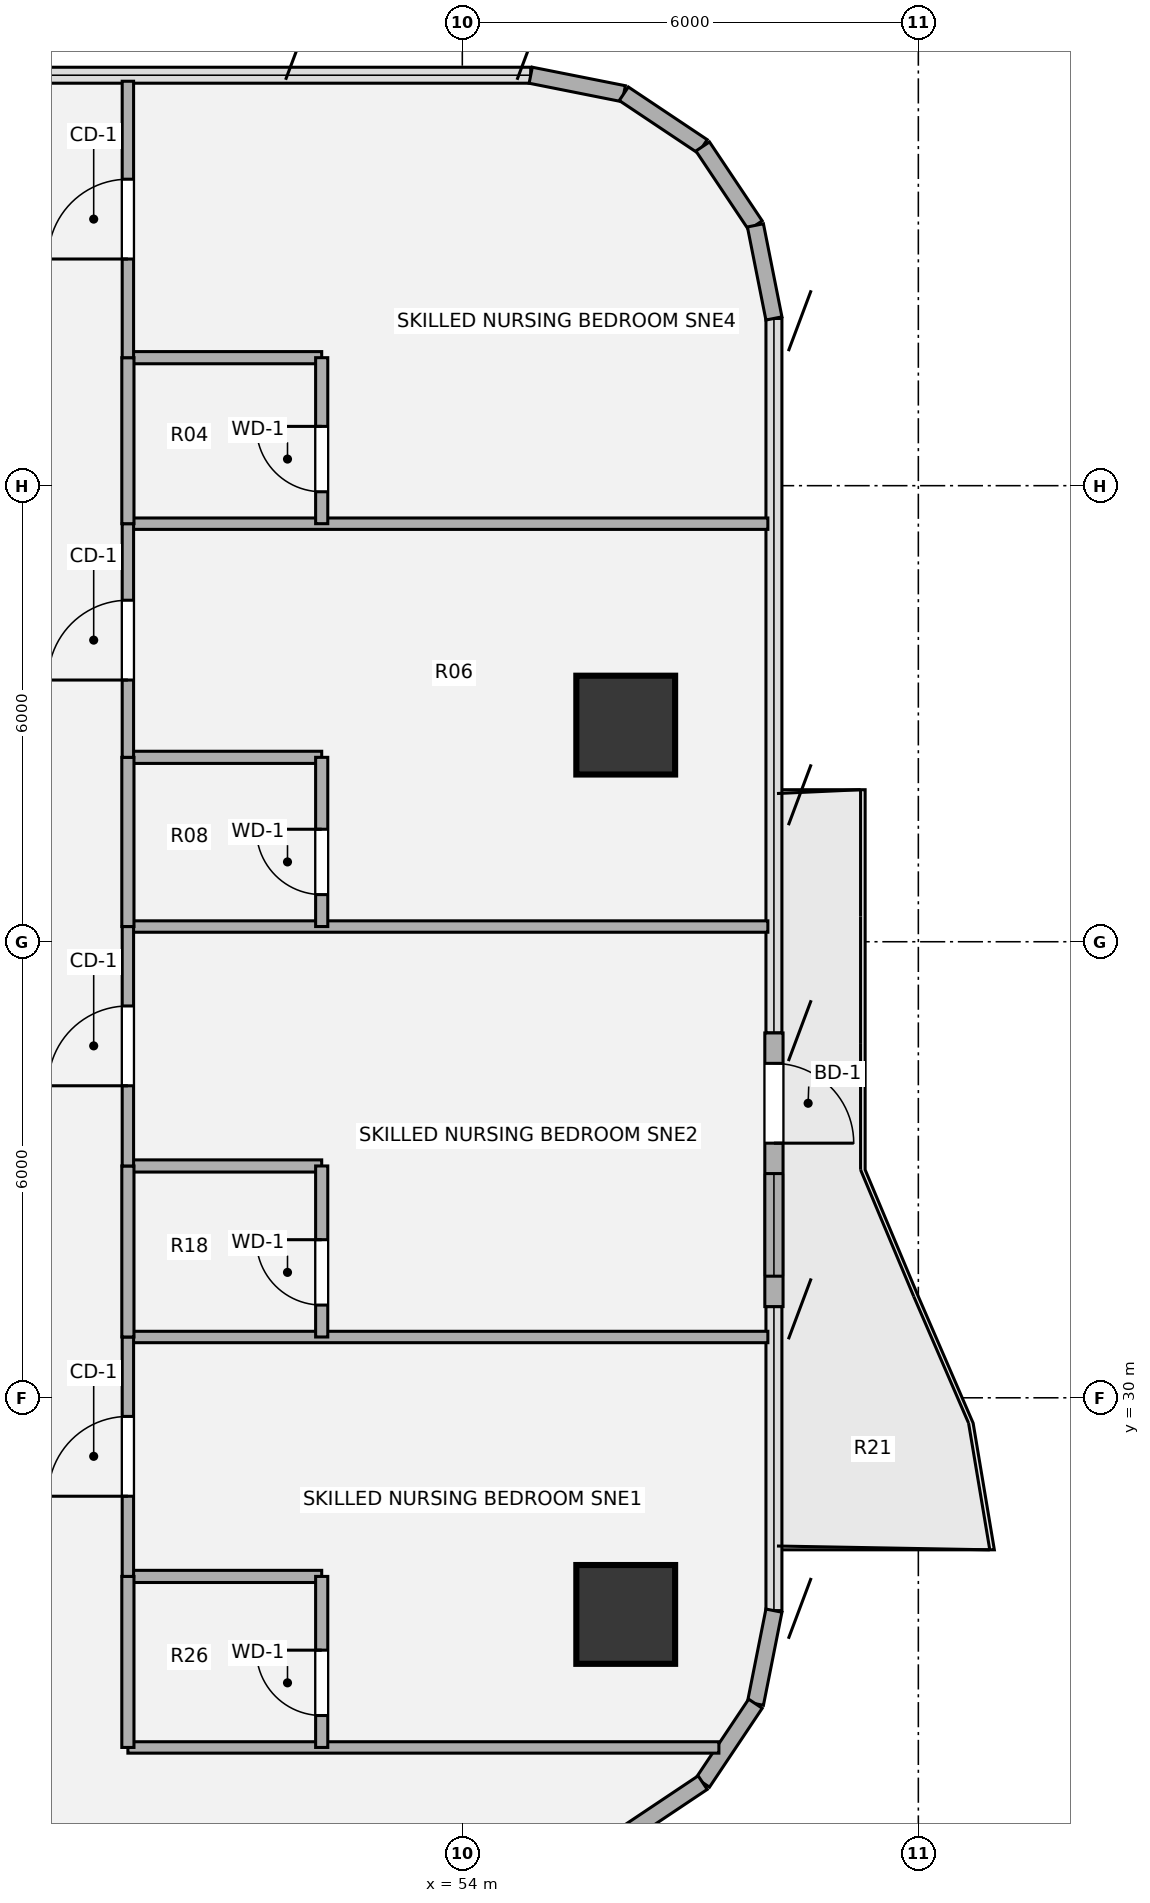
"""IFC4 building model, lengths in metres.
Left out: names, types, materials, properties, quantities, classifications, styles, units other than length and angle.
Written with IfcOpenShell. Run it as: python <this file> out.ifc"""

import sys

from ifc_helpers import new_model, si_unit, direction, frame, frame_2d, origin, origin_2d, place, context, subcontext, project, spatial, rectangle, hollow_circle, extrude, source, transform, mapped, element, fill, save


model = new_model("IFC4")
c1 = context("Model", 3, precision=1e-05, world=origin(), true_north=direction((0.0, 1.0)))
c2 = subcontext(c1, "Body", "Model", "MODEL_VIEW")
j1 = project(units=[si_unit("LENGTHUNIT", "METRE"), si_unit("PLANEANGLEUNIT", "RADIAN")], contexts=[c1])
p1 = place(None, origin())
s1 = spatial("IfcSite", under=j1, at=p1, CompositionType="ELEMENT")
p2 = place(p1, origin())
s2 = spatial("IfcBuilding", under=s1, at=p2, CompositionType="ELEMENT")
p3 = place(p2, frame((0.0, 0.0, 127.62)))
s3 = spatial("IfcBuildingStorey", under=s2, at=p3, CompositionType="ELEMENT", Elevation=127.62)
m1 = source(origin(), c2, "Body", "SweptSolid", [
    extrude(hollow_circle(Radius=0.65, WallThickness=0.045, at=origin_2d()), origin(), (0.0, 0.0, 1.0), 3.78),
])
for number, where, z_axis, x_axis in (
    (1, (56.15, 27.15, 0.0), (0.0, 0.0, 1.0), (1.0, 0.0, 0.0)),
    (2, (56.15, 38.85, 0.0), (0.0, 0.0, 1.0), (1.0, 0.0, 0.0)),
):
    element("IfcColumn", number, at=place(p3, frame(where, z_axis=z_axis, x_axis=x_axis)), inside=s3, PredefinedType="COLUMN", context=c2, shape_type="MappedRepresentation", body=[
        mapped(m1, transform((0.0, 0.0, 0.0), x_axis=(1.0, 0.0, 0.0), y_axis=(0.0, 1.0, 0.0), z_axis=(0.0, 0.0, 1.0), scale=1.0)),
    ])
for number, where, z_axis, x_axis in (
    (3, (54.9, 47.4, 0.0), (0.0, 0.0, 1.0), (0.981, -0.195, 0.0)),
    (4, (56.125, 47.156, 0.0), (0.0, 0.0, 1.0), (0.831, -0.556, 0.0)),
    (5, (57.163, 46.463, 0.0), (0.0, 0.0, 1.0), (0.556, -0.831, 0.0)),
    (6, (57.856, 45.425, 0.0), (0.0, 0.0, 1.0), (0.195, -0.981, 0.0)),
):
    element("IfcWall", number, at=place(p3, frame(where, z_axis=z_axis, x_axis=x_axis)), inside=s3, PredefinedType="SOLIDWALL", context=c2, shape_type="SweptSolid", body=[
        extrude(rectangle(XDim=1.249, YDim=0.215, at=frame_2d((0.624, 0.0))), origin(), (0.0, 0.0, 1.0), 3.53),
    ])
p4 = place(p3, frame((58.1, 34.8, 0.0), z_axis=(0.0, 0.0, 1.0), x_axis=(0.0, -1.0, 0.0)))
e7 = element("IfcWall", 7, at=p4, inside=s3, PredefinedType="SOLIDWALL", context=c2, shape_type="SweptSolid", body=[
    extrude(rectangle(XDim=3.6, YDim=0.24, at=frame_2d((1.8, 0.0))), origin(), (0.0, 0.0, 1.0), 3.53),
])
p5 = place(p4, frame((0.4, 0.0, 0.0)))
e8 = element("IfcOpeningElement", 8, at=p5, cuts=e7, PredefinedType="OPENING", context=c2, shape_type="SweptSolid", body=[
    extrude(rectangle(XDim=1.05, YDim=2.15, at=origin_2d()), frame((0.525, 0.13, 1.075), z_axis=(0.0, -1.0, 0.0), x_axis=(1.0, 0.0, 0.0)), (0.0, 0.0, 1.0), 0.26),
])
p6 = place(p4, frame((1.85, 0.0, 0.85)))
e9 = element("IfcOpeningElement", 9, at=p6, cuts=e7, PredefinedType="OPENING", context=c2, shape_type="SweptSolid", body=[
    extrude(rectangle(XDim=1.35, YDim=1.35, at=origin_2d()), frame((0.675, 0.13, 0.675), z_axis=(0.0, -1.0, 0.0), x_axis=(1.0, 0.0, 0.0)), (0.0, 0.0, 1.0), 0.26),
])
for number, where, z_axis, x_axis in (
    (10, (58.1, 27.2, 0.0), (0.0, 0.0, 1.0), (-0.195, -0.981, 0.0)),
    (11, (57.856, 25.975, 0.0), (0.0, 0.0, 1.0), (-0.556, -0.831, 0.0)),
    (12, (57.163, 24.937, 0.0), (0.0, 0.0, 1.0), (-0.831, -0.556, 0.0)),
):
    element("IfcWall", number, at=place(p3, frame(where, z_axis=z_axis, x_axis=x_axis)), inside=s3, PredefinedType="SOLIDWALL", context=c2, shape_type="SweptSolid", body=[
        extrude(rectangle(XDim=1.249, YDim=0.215, at=frame_2d((0.624, 0.0))), origin(), (0.0, 0.0, 1.0), 3.53),
    ])
p7 = place(p3, frame((49.6, 25.4, 0.0), z_axis=(0.0, 0.0, 1.0), x_axis=(1.0, 0.0, 0.0)))
e13 = element("IfcWall", 13, at=p7, inside=s3, PredefinedType="PARTITIONING", context=c2, shape_type="SweptSolid", body=[
    extrude(rectangle(XDim=7.776, YDim=0.15, at=frame_2d((3.888, 0.0))), origin(), (0.0, 0.0, 1.0), 3.5),
])
p8 = place(p3, frame((49.6, 27.65, 0.0), z_axis=(0.0, 0.0, 1.0), x_axis=(1.0, 0.0, 0.0)))
e14 = element("IfcWall", 14, at=p8, inside=s3, PredefinedType="PLUMBINGWALL", context=c2, shape_type="SweptSolid", body=[
    extrude(rectangle(XDim=2.55, YDim=0.16, at=frame_2d((1.275, 0.0))), origin(), (0.0, 0.0, 1.0), 2.982),
])
p9 = place(p3, frame((49.6, 30.8, 0.0), z_axis=(0.0, 0.0, 1.0), x_axis=(1.0, 0.0, 0.0)))
e15 = element("IfcWall", 15, at=p9, inside=s3, PredefinedType="PARTITIONING", context=c2, shape_type="SweptSolid", body=[
    extrude(rectangle(XDim=8.42, YDim=0.15, at=frame_2d((4.21, 0.0))), origin(), (0.0, 0.0, 1.0), 2.982),
])
p10 = place(p3, frame((49.6, 33.05, 0.0), z_axis=(0.0, 0.0, 1.0), x_axis=(1.0, 0.0, 0.0)))
e16 = element("IfcWall", 16, at=p10, inside=s3, PredefinedType="PLUMBINGWALL", context=c2, shape_type="SweptSolid", body=[
    extrude(rectangle(XDim=2.55, YDim=0.16, at=frame_2d((1.275, 0.0))), origin(), (0.0, 0.0, 1.0), 2.982),
])
p11 = place(p3, frame((49.6, 36.2, 0.0), z_axis=(0.0, 0.0, 1.0), x_axis=(1.0, 0.0, 0.0)))
e17 = element("IfcWall", 17, at=p11, inside=s3, PredefinedType="PARTITIONING", context=c2, shape_type="SweptSolid", body=[
    extrude(rectangle(XDim=8.42, YDim=0.15, at=frame_2d((4.21, 0.0))), origin(), (0.0, 0.0, 1.0), 2.982),
])
p12 = place(p3, frame((49.6, 38.426, 0.0), z_axis=(0.0, 0.0, 1.0), x_axis=(1.0, 0.0, 0.0)))
e18 = element("IfcWall", 18, at=p12, inside=s3, PredefinedType="PLUMBINGWALL", context=c2, shape_type="SweptSolid", body=[
    extrude(rectangle(XDim=2.55, YDim=0.16, at=frame_2d((1.275, 0.0))), origin(), (0.0, 0.0, 1.0), 3.055),
])
p13 = place(p3, frame((49.6, 41.5, 0.0), z_axis=(0.0, 0.0, 1.0), x_axis=(1.0, 0.0, 0.0)))
e19 = element("IfcWall", 19, at=p13, inside=s3, PredefinedType="PARTITIONING", context=c2, shape_type="SweptSolid", body=[
    extrude(rectangle(XDim=8.42, YDim=0.15, at=frame_2d((4.21, 0.0))), origin(), (0.0, 0.0, 1.0), 3.5),
])
p14 = place(p3, frame((49.6, 43.684, 0.0), z_axis=(0.0, 0.0, 1.0), x_axis=(1.0, 0.0, 0.0)))
e20 = element("IfcWall", 20, at=p14, inside=s3, PredefinedType="PLUMBINGWALL", context=c2, shape_type="SweptSolid", body=[
    extrude(rectangle(XDim=2.55, YDim=0.16, at=frame_2d((1.275, 0.0))), origin(), (0.0, 0.0, 1.0), 3.5),
])
p15 = place(p3, frame((49.6, 25.4, 0.0), z_axis=(0.0, 0.0, 1.0), x_axis=(0.0, 1.0, 0.0)))
e21 = element("IfcWall", 21, at=p15, inside=s3, PredefinedType="PLUMBINGWALL", context=c2, shape_type="SweptSolid", body=[
    extrude(rectangle(XDim=2.25, YDim=0.16, at=frame_2d((1.125, 0.0))), origin(), (0.0, 0.0, 1.0), 3.5),
])
p16 = place(p3, frame((49.6, 27.65, 0.0), z_axis=(0.0, 0.0, 1.0), x_axis=(0.0, 1.0, 0.0)))
e22 = element("IfcWall", 22, at=p16, inside=s3, PredefinedType="PARTITIONING", context=c2, shape_type="SweptSolid", body=[
    extrude(rectangle(XDim=3.15, YDim=0.15, at=frame_2d((1.575, 0.0))), origin(), (0.0, 0.0, 1.0), 3.5),
])
p17 = place(p16, frame((1.055, 0.0, 0.0)))
e23 = element("IfcOpeningElement", 23, at=p17, cuts=e22, PredefinedType="OPENING", context=c2, shape_type="SweptSolid", body=[
    extrude(rectangle(XDim=1.05, YDim=2.1, at=origin_2d()), frame((0.525, 0.085, 1.05), z_axis=(0.0, -1.0, 0.0), x_axis=(1.0, 0.0, 0.0)), (0.0, 0.0, 1.0), 0.17),
])
p18 = place(p3, frame((49.6, 30.8, 0.0), z_axis=(0.0, 0.0, 1.0), x_axis=(0.0, 1.0, 0.0)))
e24 = element("IfcWall", 24, at=p18, inside=s3, PredefinedType="PLUMBINGWALL", context=c2, shape_type="SweptSolid", body=[
    extrude(rectangle(XDim=2.25, YDim=0.16, at=frame_2d((1.125, 0.0))), origin(), (0.0, 0.0, 1.0), 3.5),
])
p19 = place(p3, frame((49.6, 33.05, 0.0), z_axis=(0.0, 0.0, 1.0), x_axis=(0.0, 1.0, 0.0)))
e25 = element("IfcWall", 25, at=p19, inside=s3, PredefinedType="PARTITIONING", context=c2, shape_type="SweptSolid", body=[
    extrude(rectangle(XDim=3.15, YDim=0.15, at=frame_2d((1.575, 0.0))), origin(), (0.0, 0.0, 1.0), 3.5),
])
p20 = place(p19, frame((1.055, 0.0, 0.0)))
e26 = element("IfcOpeningElement", 26, at=p20, cuts=e25, PredefinedType="OPENING", context=c2, shape_type="SweptSolid", body=[
    extrude(rectangle(XDim=1.05, YDim=2.1, at=origin_2d()), frame((0.525, 0.085, 1.05), z_axis=(0.0, -1.0, 0.0), x_axis=(1.0, 0.0, 0.0)), (0.0, 0.0, 1.0), 0.17),
])
p21 = place(p3, frame((49.6, 36.2, 0.0), z_axis=(0.0, 0.0, 1.0), x_axis=(0.0, 1.0, 0.0)))
e27 = element("IfcWall", 27, at=p21, inside=s3, PredefinedType="PLUMBINGWALL", context=c2, shape_type="SweptSolid", body=[
    extrude(rectangle(XDim=2.226, YDim=0.16, at=frame_2d((1.113, 0.0))), origin(), (0.0, 0.0, 1.0), 3.5),
])
p22 = place(p3, frame((49.6, 38.426, 0.0), z_axis=(0.0, 0.0, 1.0), x_axis=(0.0, 1.0, 0.0)))
e28 = element("IfcWall", 28, at=p22, inside=s3, PredefinedType="PARTITIONING", context=c2, shape_type="SweptSolid", body=[
    extrude(rectangle(XDim=3.074, YDim=0.15, at=frame_2d((1.537, 0.0))), origin(), (0.0, 0.0, 1.0), 3.5),
])
p23 = place(p22, frame((1.017, 0.0, 0.0)))
e29 = element("IfcOpeningElement", 29, at=p23, cuts=e28, PredefinedType="OPENING", context=c2, shape_type="SweptSolid", body=[
    extrude(rectangle(XDim=1.05, YDim=2.1, at=origin_2d()), frame((0.525, 0.085, 1.05), z_axis=(0.0, -1.0, 0.0), x_axis=(1.0, 0.0, 0.0)), (0.0, 0.0, 1.0), 0.17),
])
p24 = place(p3, frame((49.6, 41.5, 0.0), z_axis=(0.0, 0.0, 1.0), x_axis=(0.0, 1.0, 0.0)))
e30 = element("IfcWall", 30, at=p24, inside=s3, PredefinedType="PLUMBINGWALL", context=c2, shape_type="SweptSolid", body=[
    extrude(rectangle(XDim=2.184, YDim=0.16, at=frame_2d((1.092, 0.0))), origin(), (0.0, 0.0, 1.0), 3.5),
])
p25 = place(p3, frame((49.6, 43.684, 0.0), z_axis=(0.0, 0.0, 1.0), x_axis=(0.0, 1.0, 0.0)))
e31 = element("IfcWall", 31, at=p25, inside=s3, PredefinedType="PARTITIONING", context=c2, shape_type="SweptSolid", body=[
    extrude(rectangle(XDim=3.637, YDim=0.15, at=frame_2d((1.818, 0.0))), origin(), (0.0, 0.0, 1.0), 3.5),
])
p26 = place(p25, frame((1.298, 0.0, 0.0)))
e32 = element("IfcOpeningElement", 32, at=p26, cuts=e31, PredefinedType="OPENING", context=c2, shape_type="SweptSolid", body=[
    extrude(rectangle(XDim=1.05, YDim=2.1, at=origin_2d()), frame((0.525, 0.085, 1.05), z_axis=(0.0, -1.0, 0.0), x_axis=(1.0, 0.0, 0.0)), (0.0, 0.0, 1.0), 0.17),
])
p27 = place(p3, frame((52.15, 25.4, 0.0), z_axis=(0.0, 0.0, 1.0), x_axis=(0.0, 1.0, 0.0)))
e33 = element("IfcWall", 33, at=p27, inside=s3, PredefinedType="PLUMBINGWALL", context=c2, shape_type="SweptSolid", body=[
    extrude(rectangle(XDim=2.25, YDim=0.16, at=frame_2d((1.125, 0.0))), origin(), (0.0, 0.0, 1.0), 3.5),
])
p28 = place(p27, frame((0.42, 0.0, 0.0)))
e34 = element("IfcOpeningElement", 34, at=p28, cuts=e33, PredefinedType="OPENING", context=c2, shape_type="SweptSolid", body=[
    extrude(rectangle(XDim=0.86, YDim=2.1, at=origin_2d()), frame((0.43, 0.09, 1.05), z_axis=(0.0, -1.0, 0.0), x_axis=(1.0, 0.0, 0.0)), (0.0, 0.0, 1.0), 0.18),
])
p29 = place(p3, frame((52.15, 30.8, 0.0), z_axis=(0.0, 0.0, 1.0), x_axis=(0.0, 1.0, 0.0)))
e35 = element("IfcWall", 35, at=p29, inside=s3, PredefinedType="PLUMBINGWALL", context=c2, shape_type="SweptSolid", body=[
    extrude(rectangle(XDim=2.25, YDim=0.16, at=frame_2d((1.125, 0.0))), origin(), (0.0, 0.0, 1.0), 3.5),
])
p30 = place(p29, frame((0.42, 0.0, 0.0)))
e36 = element("IfcOpeningElement", 36, at=p30, cuts=e35, PredefinedType="OPENING", context=c2, shape_type="SweptSolid", body=[
    extrude(rectangle(XDim=0.86, YDim=2.1, at=origin_2d()), frame((0.43, 0.09, 1.05), z_axis=(0.0, -1.0, 0.0), x_axis=(1.0, 0.0, 0.0)), (0.0, 0.0, 1.0), 0.18),
])
p31 = place(p3, frame((52.15, 36.2, 0.0), z_axis=(0.0, 0.0, 1.0), x_axis=(0.0, 1.0, 0.0)))
e37 = element("IfcWall", 37, at=p31, inside=s3, PredefinedType="PLUMBINGWALL", context=c2, shape_type="SweptSolid", body=[
    extrude(rectangle(XDim=2.226, YDim=0.16, at=frame_2d((1.113, 0.0))), origin(), (0.0, 0.0, 1.0), 3.5),
])
p32 = place(p31, frame((0.42, 0.0, 0.0)))
e38 = element("IfcOpeningElement", 38, at=p32, cuts=e37, PredefinedType="OPENING", context=c2, shape_type="SweptSolid", body=[
    extrude(rectangle(XDim=0.86, YDim=2.1, at=origin_2d()), frame((0.43, 0.09, 1.05), z_axis=(0.0, -1.0, 0.0), x_axis=(1.0, 0.0, 0.0)), (0.0, 0.0, 1.0), 0.18),
])
p33 = place(p3, frame((52.15, 41.5, 0.0), z_axis=(0.0, 0.0, 1.0), x_axis=(0.0, 1.0, 0.0)))
e39 = element("IfcWall", 39, at=p33, inside=s3, PredefinedType="PLUMBINGWALL", context=c2, shape_type="SweptSolid", body=[
    extrude(rectangle(XDim=2.184, YDim=0.16, at=frame_2d((1.092, 0.0))), origin(), (0.0, 0.0, 1.0), 3.5),
])
p34 = place(p33, frame((0.42, 0.0, 0.0)))
e40 = element("IfcOpeningElement", 40, at=p34, cuts=e39, PredefinedType="OPENING", context=c2, shape_type="SweptSolid", body=[
    extrude(rectangle(XDim=0.86, YDim=2.1, at=origin_2d()), frame((0.43, 0.09, 1.05), z_axis=(0.0, -1.0, 0.0), x_axis=(1.0, 0.0, 0.0)), (0.0, 0.0, 1.0), 0.18),
])
m2 = source(origin(), c2, "Body", "SweptSolid", [
    extrude(rectangle(XDim=1.05, YDim=2.15, at=origin_2d()), frame((0.525, 0.025, 1.075), z_axis=(0.0, -1.0, 0.0), x_axis=(1.0, 0.0, 0.0)), (0.0, 0.0, 1.0), 0.05),
])
p35 = place(p5, origin())
e41 = element("IfcDoor", 41, at=p35, inside=s3, OperationType="SINGLE_SWING_RIGHT", PredefinedType="DOOR", context=c2, shape_type="MappedRepresentation", body=[
    mapped(m2, transform((0.0, 0.0, 0.0), x_axis=(1.0, 0.0, 0.0), y_axis=(0.0, 1.0, 0.0), z_axis=(0.0, 0.0, 1.0), scale=1.0)),
])
fill(e8, e41)
m3 = source(origin(), c2, "Body", "SweptSolid", [
    extrude(rectangle(XDim=1.35, YDim=1.35, at=origin_2d()), frame((0.675, 0.03, 0.675), z_axis=(0.0, -1.0, 0.0), x_axis=(1.0, 0.0, 0.0)), (0.0, 0.0, 1.0), 0.06),
])
p36 = place(p6, origin())
e42 = element("IfcWindow", 42, at=p36, inside=s3, PartitioningType="SINGLE_PANEL", PredefinedType="WINDOW", context=c2, shape_type="MappedRepresentation", body=[
    mapped(m3, transform((0.0, 0.0, 0.0), x_axis=(1.0, 0.0, 0.0), y_axis=(0.0, 1.0, 0.0), z_axis=(0.0, 0.0, 1.0), scale=1.0)),
])
fill(e9, e42)
m4 = source(origin(), c2, "Body", "SweptSolid", [
    extrude(rectangle(XDim=1.05, YDim=2.1, at=origin_2d()), frame((0.525, 0.025, 1.05), z_axis=(0.0, -1.0, 0.0), x_axis=(1.0, 0.0, 0.0)), (0.0, 0.0, 1.0), 0.05),
])
p37 = place(p17, origin())
e43 = element("IfcDoor", 43, at=p37, inside=s3, OperationType="SINGLE_SWING_LEFT", PredefinedType="DOOR", context=c2, shape_type="MappedRepresentation", body=[
    mapped(m4, transform((0.0, 0.0, 0.0), x_axis=(1.0, 0.0, 0.0), y_axis=(0.0, 1.0, 0.0), z_axis=(0.0, 0.0, 1.0), scale=1.0)),
])
fill(e23, e43)
p38 = place(p20, origin())
e44 = element("IfcDoor", 44, at=p38, inside=s3, OperationType="SINGLE_SWING_LEFT", PredefinedType="DOOR", context=c2, shape_type="MappedRepresentation", body=[
    mapped(m4, transform((0.0, 0.0, 0.0), x_axis=(1.0, 0.0, 0.0), y_axis=(0.0, 1.0, 0.0), z_axis=(0.0, 0.0, 1.0), scale=1.0)),
])
fill(e26, e44)
p39 = place(p23, origin())
e45 = element("IfcDoor", 45, at=p39, inside=s3, OperationType="SINGLE_SWING_LEFT", PredefinedType="DOOR", context=c2, shape_type="MappedRepresentation", body=[
    mapped(m4, transform((0.0, 0.0, 0.0), x_axis=(1.0, 0.0, 0.0), y_axis=(0.0, 1.0, 0.0), z_axis=(0.0, 0.0, 1.0), scale=1.0)),
])
fill(e29, e45)
p40 = place(p26, origin())
e46 = element("IfcDoor", 46, at=p40, inside=s3, OperationType="SINGLE_SWING_LEFT", PredefinedType="DOOR", context=c2, shape_type="MappedRepresentation", body=[
    mapped(m4, transform((0.0, 0.0, 0.0), x_axis=(1.0, 0.0, 0.0), y_axis=(0.0, 1.0, 0.0), z_axis=(0.0, 0.0, 1.0), scale=1.0)),
])
fill(e32, e46)
m5 = source(origin(), c2, "Body", "SweptSolid", [
    extrude(rectangle(XDim=0.86, YDim=2.1, at=origin_2d()), frame((0.43, 0.025, 1.05), z_axis=(0.0, -1.0, 0.0), x_axis=(1.0, 0.0, 0.0)), (0.0, 0.0, 1.0), 0.05),
])
p41 = place(p28, origin())
e47 = element("IfcDoor", 47, at=p41, inside=s3, OperationType="SINGLE_SWING_RIGHT", PredefinedType="DOOR", context=c2, shape_type="MappedRepresentation", body=[
    mapped(m5, transform((0.0, 0.0, 0.0), x_axis=(1.0, 0.0, 0.0), y_axis=(0.0, 1.0, 0.0), z_axis=(0.0, 0.0, 1.0), scale=1.0)),
])
fill(e34, e47)
p42 = place(p30, origin())
e48 = element("IfcDoor", 48, at=p42, inside=s3, OperationType="SINGLE_SWING_RIGHT", PredefinedType="DOOR", context=c2, shape_type="MappedRepresentation", body=[
    mapped(m5, transform((0.0, 0.0, 0.0), x_axis=(1.0, 0.0, 0.0), y_axis=(0.0, 1.0, 0.0), z_axis=(0.0, 0.0, 1.0), scale=1.0)),
])
fill(e36, e48)
p43 = place(p32, origin())
e49 = element("IfcDoor", 49, at=p43, inside=s3, OperationType="SINGLE_SWING_RIGHT", PredefinedType="DOOR", context=c2, shape_type="MappedRepresentation", body=[
    mapped(m5, transform((0.0, 0.0, 0.0), x_axis=(1.0, 0.0, 0.0), y_axis=(0.0, 1.0, 0.0), z_axis=(0.0, 0.0, 1.0), scale=1.0)),
])
fill(e38, e49)
p44 = place(p34, origin())
e50 = element("IfcDoor", 50, at=p44, inside=s3, OperationType="SINGLE_SWING_RIGHT", PredefinedType="DOOR", context=c2, shape_type="MappedRepresentation", body=[
    mapped(m5, transform((0.0, 0.0, 0.0), x_axis=(1.0, 0.0, 0.0), y_axis=(0.0, 1.0, 0.0), z_axis=(0.0, 0.0, 1.0), scale=1.0)),
])
fill(e40, e50)
save(model, sys.argv[1])
